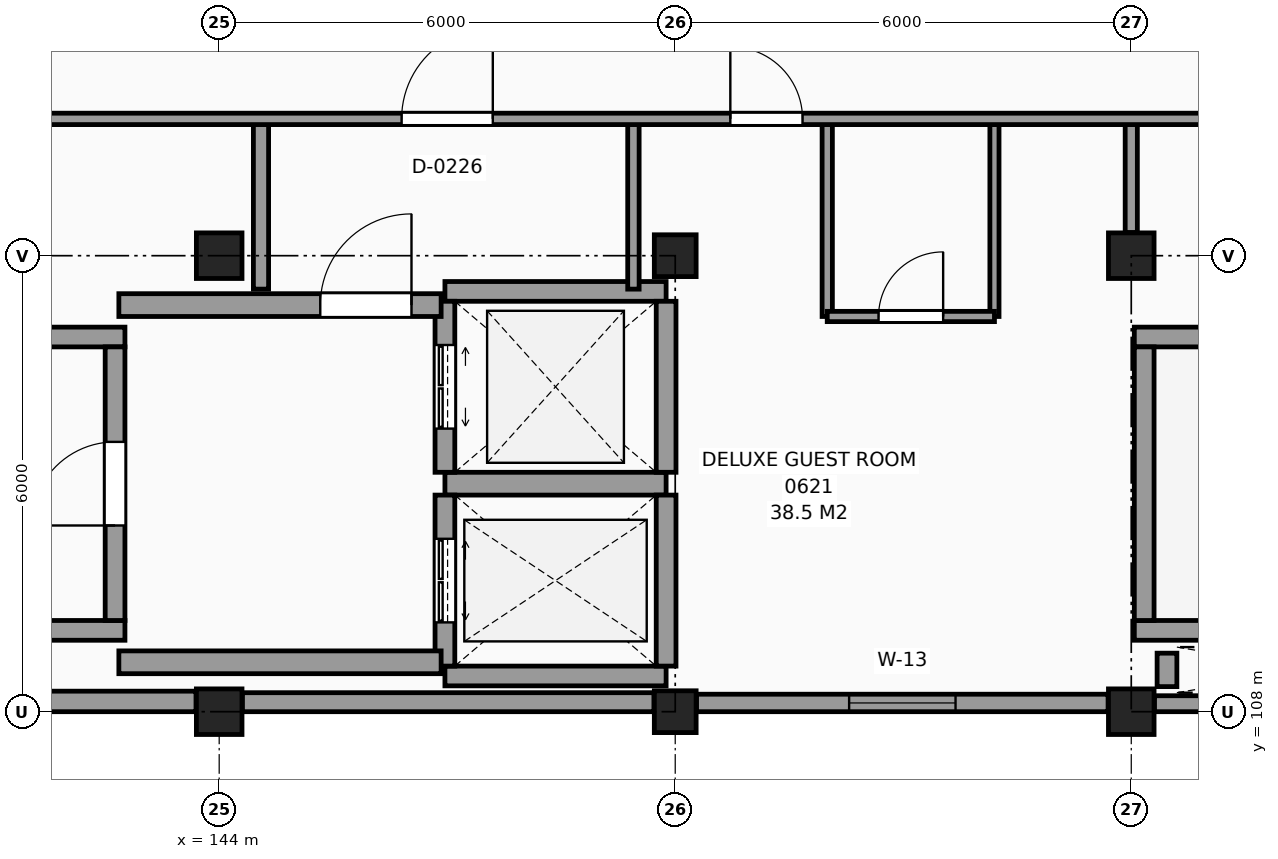
"""IFC4 building model, lengths in metres.
Left out: names, types, materials, properties, quantities, classifications, styles, units other than length and angle.
Written with IfcOpenShell. Run it as: python <this file> out.ifc"""

import sys

from ifc_helpers import new_model, si_unit, direction, frame, frame_2d, origin, origin_2d, place, context, subcontext, project, spatial, rectangle, extrude, element, fill, save


model = new_model("IFC4")
c1 = context("Model", 3, precision=1e-05, world=origin(), true_north=direction((0.0, 1.0)))
c2 = subcontext(c1, "Body", "Model", "MODEL_VIEW")
j1 = project(units=[si_unit("LENGTHUNIT", "METRE"), si_unit("PLANEANGLEUNIT", "RADIAN")], contexts=[c1])
p1 = place(None, origin())
s1 = spatial("IfcSite", under=j1, at=p1, CompositionType="ELEMENT")
p2 = place(p1, origin())
s2 = spatial("IfcBuilding", under=s1, at=p2, CompositionType="ELEMENT")
p3 = place(p2, frame((0.0, 0.0, 28.2)))
s3 = spatial("IfcBuildingStorey", under=s2, at=p3, CompositionType="ELEMENT", Elevation=28.2)
for number, where, z_axis, x_axis in (
    (1, (144.0, 108.0, 0.0), (0.0, 0.0, 1.0), (1.0, 0.0, 0.0)),
    (2, (144.0, 114.0, 0.0), (0.0, 0.0, 1.0), (1.0, 0.0, 0.0)),
):
    element("IfcColumn", number, at=place(p3, frame(where, z_axis=z_axis, x_axis=x_axis)), inside=s3, PredefinedType="COLUMN", context=c2, shape_type="SweptSolid", body=[
        extrude(rectangle(XDim=0.6, YDim=0.6, at=origin_2d()), origin(), (0.0, 0.0, 1.0), 3.3),
    ])
for number, where, z_axis, x_axis in (
    (3, (150.0, 108.0, 0.0), (0.0, 0.0, 1.0), (1.0, 0.0, 0.0)),
    (4, (150.0, 114.0, 0.0), (0.0, 0.0, 1.0), (1.0, 0.0, 0.0)),
):
    element("IfcColumn", number, at=place(p3, frame(where, z_axis=z_axis, x_axis=x_axis)), inside=s3, PredefinedType="COLUMN", context=c2, shape_type="SweptSolid", body=[
        extrude(rectangle(XDim=0.55, YDim=0.55, at=origin_2d()), origin(), (0.0, 0.0, 1.0), 3.3),
    ])
for number, where, z_axis, x_axis in (
    (5, (156.0, 108.0, 0.0), (0.0, 0.0, 1.0), (1.0, 0.0, 0.0)),
    (6, (156.0, 114.0, 0.0), (0.0, 0.0, 1.0), (1.0, 0.0, 0.0)),
):
    element("IfcColumn", number, at=place(p3, frame(where, z_axis=z_axis, x_axis=x_axis)), inside=s3, PredefinedType="COLUMN", context=c2, shape_type="SweptSolid", body=[
        extrude(rectangle(XDim=0.6, YDim=0.6, at=origin_2d()), origin(), (0.0, 0.0, 1.0), 3.3),
    ])
p4 = place(p3, frame((138.28, 108.135, 0.0), z_axis=(0.0, 0.0, 1.0), x_axis=(1.0, 0.0, 0.0)))
e7 = element("IfcWall", 7, at=p4, inside=s3, PredefinedType="SOLIDWALL", context=c2, shape_type="SweptSolid", body=[
    extrude(rectangle(XDim=5.415, YDim=0.27, at=frame_2d((2.708, 0.0))), origin(), (0.0, 0.0, 1.0), 2.43),
])
p5 = place(p3, frame((144.305, 108.125, 0.0), z_axis=(0.0, 0.0, 1.0), x_axis=(1.0, 0.0, 0.0)))
e8 = element("IfcWall", 8, at=p5, inside=s3, PredefinedType="SOLIDWALL", context=c2, shape_type="SweptSolid", body=[
    extrude(rectangle(XDim=5.415, YDim=0.25, at=frame_2d((2.708, 0.0))), origin(), (0.0, 0.0, 1.0), 2.43),
])
p6 = place(p3, frame((150.28, 108.115, 0.0), z_axis=(0.0, 0.0, 1.0), x_axis=(1.0, 0.0, 0.0)))
e9 = element("IfcWall", 9, at=p6, inside=s3, PredefinedType="SOLIDWALL", context=c2, shape_type="SweptSolid", body=[
    extrude(rectangle(XDim=5.415, YDim=0.23, at=frame_2d((2.708, 0.0))), origin(), (0.0, 0.0, 1.0), 2.43),
])
p7 = place(p6, frame((2.008, 0.0, 0.8)))
e10 = element("IfcOpeningElement", 10, at=p7, cuts=e9, PredefinedType="OPENING", context=c2, shape_type="SweptSolid", body=[
    extrude(rectangle(XDim=1.4, YDim=1.4, at=frame_2d((0.7, 0.7))), frame((0.0, 0.125, 0.0), z_axis=(0.0, -1.0, 0.0), x_axis=(1.0, 0.0, 0.0)), (0.0, 0.0, 1.0), 0.25),
])
p8 = place(p3, frame((156.305, 108.105, 0.0), z_axis=(0.0, 0.0, 1.0), x_axis=(1.0, 0.0, 0.0)))
e11 = element("IfcWall", 11, at=p8, inside=s3, PredefinedType="SOLIDWALL", context=c2, shape_type="SweptSolid", body=[
    extrude(rectangle(XDim=5.415, YDim=0.21, at=frame_2d((2.708, 0.0))), origin(), (0.0, 0.0, 1.0), 3.08),
])
for number, where, z_axis, x_axis in (
    (12, (156.04, 109.07, 0.0), (0.0, 0.0, 1.0), (1.0, 0.0, 0.0)),
    (13, (156.04, 112.93, 0.0), (0.0, 0.0, 1.0), (1.0, 0.0, 0.0)),
):
    element("IfcWall", number, at=place(p3, frame(where, z_axis=z_axis, x_axis=x_axis)), inside=s3, PredefinedType="SHEAR", context=c2, shape_type="SweptSolid", body=[
        extrude(rectangle(XDim=10.72, YDim=0.26, at=frame_2d((5.36, 0.0))), origin(), (0.0, 0.0, 1.0), 3.3),
    ])
p9 = place(p3, frame((156.17, 109.2, 0.0), z_axis=(0.0, 0.0, 1.0), x_axis=(0.0, 1.0, 0.0)))
e14 = element("IfcWall", 14, at=p9, inside=s3, PredefinedType="SHEAR", context=c2, shape_type="SweptSolid", body=[
    extrude(rectangle(XDim=3.6, YDim=0.26, at=frame_2d((1.8, 0.0))), origin(), (0.0, 0.0, 1.0), 3.3),
])
p10 = place(p3, frame((156.47, 108.33, 0.0), z_axis=(0.0, 0.0, 1.0), x_axis=(0.0, 1.0, 0.0)))
e15 = element("IfcWall", 15, at=p10, inside=s3, PredefinedType="SHEAR", context=c2, shape_type="SweptSolid", body=[
    extrude(rectangle(XDim=0.44, YDim=0.26, at=frame_2d((0.22, 0.0))), origin(), (0.0, 0.0, 1.0), 3.3),
])
for number, where, z_axis, x_axis in (
    (16, (132.04, 109.07, 0.0), (0.0, 0.0, 1.0), (1.0, 0.0, 0.0)),
    (17, (132.04, 112.93, 0.0), (0.0, 0.0, 1.0), (1.0, 0.0, 0.0)),
):
    element("IfcWall", number, at=place(p3, frame(where, z_axis=z_axis, x_axis=x_axis)), inside=s3, PredefinedType="SHEAR", context=c2, shape_type="SweptSolid", body=[
        extrude(rectangle(XDim=10.72, YDim=0.26, at=frame_2d((5.36, 0.0))), origin(), (0.0, 0.0, 1.0), 3.3),
    ])
p11 = place(p3, frame((142.63, 109.2, 0.0), z_axis=(0.0, 0.0, 1.0), x_axis=(0.0, 1.0, 0.0)))
e18 = element("IfcWall", 18, at=p11, inside=s3, PredefinedType="SHEAR", context=c2, shape_type="SweptSolid", body=[
    extrude(rectangle(XDim=3.6, YDim=0.26, at=frame_2d((1.8, 0.0))), origin(), (0.0, 0.0, 1.0), 3.3),
])
p12 = place(p11, frame((1.25, 0.0, 0.0)))
e19 = element("IfcOpeningElement", 19, at=p12, cuts=e18, PredefinedType="OPENING", context=c2, shape_type="SweptSolid", body=[
    extrude(rectangle(XDim=1.1, YDim=2.15, at=frame_2d((0.55, 1.075))), frame((0.0, 0.14, 0.0), z_axis=(0.0, -1.0, 0.0), x_axis=(1.0, 0.0, 0.0)), (0.0, 0.0, 1.0), 0.28),
])
p13 = place(p3, frame((146.97, 108.47, 0.0), z_axis=(0.0, 0.0, 1.0), x_axis=(1.0, 0.0, 0.0)))
e20 = element("IfcWall", 20, at=p13, inside=s3, PredefinedType="SHEAR", context=c2, shape_type="SweptSolid", body=[
    extrude(rectangle(XDim=2.91, YDim=0.26, at=frame_2d((1.455, 0.0))), origin(), (0.0, 0.0, 1.0), 3.3),
])
p14 = place(p3, frame((146.97, 111.0, 0.0), z_axis=(0.0, 0.0, 1.0), x_axis=(1.0, 0.0, 0.0)))
e21 = element("IfcWall", 21, at=p14, inside=s3, PredefinedType="SHEAR", context=c2, shape_type="SweptSolid", body=[
    extrude(rectangle(XDim=2.91, YDim=0.3, at=frame_2d((1.455, 0.0))), origin(), (0.0, 0.0, 1.0), 3.3),
])
p15 = place(p3, frame((149.88, 108.6, 0.0), z_axis=(0.0, 0.0, 1.0), x_axis=(0.0, 1.0, 0.0)))
e22 = element("IfcWall", 22, at=p15, inside=s3, PredefinedType="SHEAR", context=c2, shape_type="SweptSolid", body=[
    extrude(rectangle(XDim=2.25, YDim=0.26, at=frame_2d((1.125, 0.0))), origin(), (0.0, 0.0, 1.0), 3.3),
])
p16 = place(p3, frame((146.97, 108.6, 0.0), z_axis=(0.0, 0.0, 1.0), x_axis=(0.0, 1.0, 0.0)))
e23 = element("IfcWall", 23, at=p16, inside=s3, PredefinedType="SHEAR", context=c2, shape_type="SweptSolid", body=[
    extrude(rectangle(XDim=2.25, YDim=0.26, at=frame_2d((1.125, 0.0))), origin(), (0.0, 0.0, 1.0), 3.3),
])
p17 = place(p16, frame((0.575, 0.0, 0.0)))
e24 = element("IfcOpeningElement", 24, at=p17, cuts=e23, PredefinedType="OPENING", context=c2, shape_type="SweptSolid", body=[
    extrude(rectangle(XDim=1.1, YDim=2.2, at=frame_2d((0.55, 1.1))), frame((0.0, 0.14, 0.0), z_axis=(0.0, -1.0, 0.0), x_axis=(1.0, 0.0, 0.0)), (0.0, 0.0, 1.0), 0.28),
])
p18 = place(p3, frame((146.97, 113.53, 0.0), z_axis=(0.0, 0.0, 1.0), x_axis=(1.0, 0.0, 0.0)))
e25 = element("IfcWall", 25, at=p18, inside=s3, PredefinedType="SHEAR", context=c2, shape_type="SweptSolid", body=[
    extrude(rectangle(XDim=2.91, YDim=0.26, at=frame_2d((1.455, 0.0))), origin(), (0.0, 0.0, 1.0), 3.3),
])
p19 = place(p3, frame((149.88, 111.15, 0.0), z_axis=(0.0, 0.0, 1.0), x_axis=(0.0, 1.0, 0.0)))
e26 = element("IfcWall", 26, at=p19, inside=s3, PredefinedType="SHEAR", context=c2, shape_type="SweptSolid", body=[
    extrude(rectangle(XDim=2.25, YDim=0.26, at=frame_2d((1.125, 0.0))), origin(), (0.0, 0.0, 1.0), 3.3),
])
p20 = place(p3, frame((146.97, 111.15, 0.0), z_axis=(0.0, 0.0, 1.0), x_axis=(0.0, 1.0, 0.0)))
e27 = element("IfcWall", 27, at=p20, inside=s3, PredefinedType="SHEAR", context=c2, shape_type="SweptSolid", body=[
    extrude(rectangle(XDim=2.25, YDim=0.26, at=frame_2d((1.125, 0.0))), origin(), (0.0, 0.0, 1.0), 3.3),
])
p21 = place(p20, frame((0.575, 0.0, 0.0)))
e28 = element("IfcOpeningElement", 28, at=p21, cuts=e27, PredefinedType="OPENING", context=c2, shape_type="SweptSolid", body=[
    extrude(rectangle(XDim=1.1, YDim=2.2, at=frame_2d((0.55, 1.1))), frame((0.0, 0.14, 0.0), z_axis=(0.0, -1.0, 0.0), x_axis=(1.0, 0.0, 0.0)), (0.0, 0.0, 1.0), 0.28),
])
p22 = place(p3, frame((142.68, 113.35, 0.0), z_axis=(0.0, 0.0, 1.0), x_axis=(1.0, 0.0, 0.0)))
e29 = element("IfcWall", 29, at=p22, inside=s3, PredefinedType="SHEAR", context=c2, shape_type="SweptSolid", body=[
    extrude(rectangle(XDim=4.24, YDim=0.3, at=frame_2d((2.12, 0.0))), origin(), (0.0, 0.0, 1.0), 3.3),
])
p23 = place(p22, frame((2.65, 0.0, 0.0)))
e30 = element("IfcOpeningElement", 30, at=p23, cuts=e29, PredefinedType="OPENING", context=c2, shape_type="SweptSolid", body=[
    extrude(rectangle(XDim=1.2, YDim=2.2, at=frame_2d((0.6, 1.1))), frame((0.0, 0.16, 0.0), z_axis=(0.0, -1.0, 0.0), x_axis=(1.0, 0.0, 0.0)), (0.0, 0.0, 1.0), 0.32),
])
p24 = place(p3, frame((142.68, 108.65, 0.0), z_axis=(0.0, 0.0, 1.0), x_axis=(1.0, 0.0, 0.0)))
e31 = element("IfcWall", 31, at=p24, inside=s3, PredefinedType="SHEAR", context=c2, shape_type="SweptSolid", body=[
    extrude(rectangle(XDim=4.24, YDim=0.3, at=frame_2d((2.12, 0.0))), origin(), (0.0, 0.0, 1.0), 3.3),
])
p25 = place(p3, frame((144.55, 113.56, 0.0), z_axis=(0.0, 0.0, 1.0), x_axis=(0.0, 1.0, 0.0)))
e32 = element("IfcWall", 32, at=p25, inside=s3, PredefinedType="PARTITIONING", context=c2, shape_type="SweptSolid", body=[
    extrude(rectangle(XDim=2.24, YDim=0.2, at=frame_2d((1.12, 0.0))), origin(), (0.0, 0.0, 1.0), 3.08),
])
p26 = place(p3, frame((149.45, 113.56, 0.0), z_axis=(0.0, 0.0, 1.0), x_axis=(0.0, 1.0, 0.0)))
e33 = element("IfcWall", 33, at=p26, inside=s3, PredefinedType="PARTITIONING", context=c2, shape_type="SweptSolid", body=[
    extrude(rectangle(XDim=2.24, YDim=0.15, at=frame_2d((1.12, 0.0))), origin(), (0.0, 0.0, 1.0), 3.08),
])
p27 = place(p3, frame((152.0, 113.2, 0.0), z_axis=(0.0, 0.0, 1.0), x_axis=(0.0, 1.0, 0.0)))
e34 = element("IfcWall", 34, at=p27, inside=s3, PredefinedType="PARTITIONING", context=c2, shape_type="SweptSolid", body=[
    extrude(rectangle(XDim=2.6, YDim=0.135, at=frame_2d((1.3, 0.0))), origin(), (0.0, 0.0, 1.0), 3.08),
])
p28 = place(p3, frame((154.2, 113.2, 0.0), z_axis=(0.0, 0.0, 1.0), x_axis=(0.0, 1.0, 0.0)))
e35 = element("IfcWall", 35, at=p28, inside=s3, PredefinedType="PARTITIONING", context=c2, shape_type="SweptSolid", body=[
    extrude(rectangle(XDim=2.6, YDim=0.12, at=frame_2d((1.3, 0.0))), origin(), (0.0, 0.0, 1.0), 3.08),
])
p29 = place(p3, frame((156.0, 114.305, 0.0), z_axis=(0.0, 0.0, 1.0), x_axis=(0.0, 1.0, 0.0)))
e36 = element("IfcWall", 36, at=p29, inside=s3, PredefinedType="PARTITIONING", context=c2, shape_type="SweptSolid", body=[
    extrude(rectangle(XDim=1.495, YDim=0.16, at=frame_2d((0.748, 0.0))), origin(), (0.0, 0.0, 1.0), 2.38),
])
p30 = place(p3, frame((152.0, 113.2, 0.0), z_axis=(0.0, 0.0, 1.0), x_axis=(1.0, 0.0, 0.0)))
e37 = element("IfcWall", 37, at=p30, inside=s3, PredefinedType="PARTITIONING", context=c2, shape_type="SweptSolid", body=[
    extrude(rectangle(XDim=2.2, YDim=0.135, at=frame_2d((1.1, 0.0))), origin(), (0.0, 0.0, 1.0), 3.08),
])
p31 = place(p30, frame((0.675, 0.0, 0.0)))
e38 = element("IfcOpeningElement", 38, at=p31, cuts=e37, PredefinedType="OPENING", context=c2, shape_type="SweptSolid", body=[
    extrude(rectangle(XDim=0.85, YDim=2.1, at=frame_2d((0.425, 1.05))), frame((0.0, 0.078, 0.0), z_axis=(0.0, -1.0, 0.0), x_axis=(1.0, 0.0, 0.0)), (0.0, 0.0, 1.0), 0.155),
])
p32 = place(p3, frame((66.235, 115.8, 0.0), z_axis=(0.0, 0.0, 1.0), x_axis=(1.0, 0.0, 0.0)))
e39 = element("IfcWall", 39, at=p32, inside=s3, PredefinedType="PARTITIONING", context=c2, shape_type="SweptSolid", body=[
    extrude(rectangle(XDim=103.565, YDim=0.15, at=frame_2d((51.782, 0.0))), origin(), (0.0, 0.0, 1.0), 3.08),
])
p33 = place(p32, frame((80.165, 0.0, 0.0)))
e40 = element("IfcOpeningElement", 40, at=p33, cuts=e39, PredefinedType="OPENING", context=c2, shape_type="SweptSolid", body=[
    extrude(rectangle(XDim=1.2, YDim=2.2, at=frame_2d((0.6, 1.1))), frame((0.0, 0.085, 0.0), z_axis=(0.0, -1.0, 0.0), x_axis=(1.0, 0.0, 0.0)), (0.0, 0.0, 1.0), 0.17),
])
p34 = place(p32, frame((50.165, 0.0, 0.0)))
e41 = element("IfcOpeningElement", 41, at=p34, cuts=e39, PredefinedType="OPENING", context=c2, shape_type="SweptSolid", body=[
    extrude(rectangle(XDim=1.2, YDim=2.2, at=frame_2d((0.6, 1.1))), frame((0.0, 0.085, 0.0), z_axis=(0.0, -1.0, 0.0), x_axis=(1.0, 0.0, 0.0)), (0.0, 0.0, 1.0), 0.17),
])
p35 = place(p32, frame((9.015, 0.0, 0.0)))
e42 = element("IfcOpeningElement", 42, at=p35, cuts=e39, PredefinedType="OPENING", context=c2, shape_type="SweptSolid", body=[
    extrude(rectangle(XDim=1.1, YDim=2.15, at=frame_2d((0.55, 1.075))), frame((0.0, 0.085, 0.0), z_axis=(0.0, -1.0, 0.0), x_axis=(1.0, 0.0, 0.0)), (0.0, 0.0, 1.0), 0.17),
])
p36 = place(p32, frame((55.315, 0.0, 0.0)))
e43 = element("IfcOpeningElement", 43, at=p36, cuts=e39, PredefinedType="OPENING", context=c2, shape_type="SweptSolid", body=[
    extrude(rectangle(XDim=1.0, YDim=2.15, at=frame_2d((0.5, 1.075))), frame((0.0, 0.085, 0.0), z_axis=(0.0, -1.0, 0.0), x_axis=(1.0, 0.0, 0.0)), (0.0, 0.0, 1.0), 0.17),
])
p37 = place(p32, frame((62.285, 0.0, 0.0)))
e44 = element("IfcOpeningElement", 44, at=p37, cuts=e39, PredefinedType="OPENING", context=c2, shape_type="SweptSolid", body=[
    extrude(rectangle(XDim=0.96, YDim=2.15, at=frame_2d((0.48, 1.075))), frame((0.0, 0.085, 0.0), z_axis=(0.0, -1.0, 0.0), x_axis=(1.0, 0.0, 0.0)), (0.0, 0.0, 1.0), 0.17),
])
p38 = place(p32, frame((31.965, 0.0, 0.0)))
e45 = element("IfcOpeningElement", 45, at=p38, cuts=e39, PredefinedType="OPENING", context=c2, shape_type="SweptSolid", body=[
    extrude(rectangle(XDim=1.6, YDim=2.25, at=frame_2d((0.8, 1.125))), frame((0.0, 0.085, 0.0), z_axis=(0.0, -1.0, 0.0), x_axis=(1.0, 0.0, 0.0)), (0.0, 0.0, 1.0), 0.17),
])
p39 = place(p32, frame((18.59, 0.0, 0.0)))
e46 = element("IfcOpeningElement", 46, at=p39, cuts=e39, PredefinedType="OPENING", context=c2, shape_type="SweptSolid", body=[
    extrude(rectangle(XDim=0.95, YDim=2.1, at=frame_2d((0.475, 1.05))), frame((0.0, 0.085, 0.0), z_axis=(0.0, -1.0, 0.0), x_axis=(1.0, 0.0, 0.0)), (0.0, 0.0, 1.0), 0.17),
])
p40 = place(p32, frame((24.59, 0.0, 0.0)))
e47 = element("IfcOpeningElement", 47, at=p40, cuts=e39, PredefinedType="OPENING", context=c2, shape_type="SweptSolid", body=[
    extrude(rectangle(XDim=0.95, YDim=2.1, at=frame_2d((0.475, 1.05))), frame((0.0, 0.085, 0.0), z_axis=(0.0, -1.0, 0.0), x_axis=(1.0, 0.0, 0.0)), (0.0, 0.0, 1.0), 0.17),
])
p41 = place(p32, frame((84.49, 0.0, 0.0)))
e48 = element("IfcOpeningElement", 48, at=p41, cuts=e39, PredefinedType="OPENING", context=c2, shape_type="SweptSolid", body=[
    extrude(rectangle(XDim=0.95, YDim=2.1, at=frame_2d((0.475, 1.05))), frame((0.0, 0.085, 0.0), z_axis=(0.0, -1.0, 0.0), x_axis=(1.0, 0.0, 0.0)), (0.0, 0.0, 1.0), 0.17),
])
p42 = place(p7, origin())
e49 = element("IfcWindow", 49, at=p42, inside=s3, PartitioningType="SINGLE_PANEL", PredefinedType="WINDOW", context=c2, shape_type="SweptSolid", body=[
    extrude(rectangle(XDim=1.4, YDim=1.4, at=frame_2d((0.7, 0.7))), frame((0.0, 0.03, 0.0), z_axis=(0.0, -1.0, 0.0), x_axis=(1.0, 0.0, 0.0)), (0.0, 0.0, 1.0), 0.06),
])
fill(e10, e49)
p43 = place(p12, origin())
e50 = element("IfcDoor", 50, at=p43, inside=s3, OperationType="SINGLE_SWING_LEFT", PredefinedType="DOOR", context=c2, shape_type="SweptSolid", body=[
    extrude(rectangle(XDim=1.1, YDim=2.15, at=frame_2d((0.55, 1.075))), frame((0.0, 0.025, 0.0), z_axis=(0.0, -1.0, 0.0), x_axis=(1.0, 0.0, 0.0)), (0.0, 0.0, 1.0), 0.05),
])
fill(e19, e50)
p44 = place(p17, origin())
e51 = element("IfcDoor", 51, at=p44, inside=s3, OperationType="DOUBLE_DOOR_SLIDING", PredefinedType="DOOR", context=c2, shape_type="SweptSolid", body=[
    extrude(rectangle(XDim=1.1, YDim=2.2, at=frame_2d((0.55, 1.1))), frame((0.0, 0.025, 0.0), z_axis=(0.0, -1.0, 0.0), x_axis=(1.0, 0.0, 0.0)), (0.0, 0.0, 1.0), 0.05),
])
fill(e24, e51)
p45 = place(p21, origin())
e52 = element("IfcDoor", 52, at=p45, inside=s3, OperationType="DOUBLE_DOOR_SLIDING", PredefinedType="DOOR", context=c2, shape_type="SweptSolid", body=[
    extrude(rectangle(XDim=1.1, YDim=2.2, at=frame_2d((0.55, 1.1))), frame((0.0, 0.025, 0.0), z_axis=(0.0, -1.0, 0.0), x_axis=(1.0, 0.0, 0.0)), (0.0, 0.0, 1.0), 0.05),
])
fill(e28, e52)
p46 = place(p23, origin())
e53 = element("IfcDoor", 53, at=p46, inside=s3, OperationType="SINGLE_SWING_RIGHT", PredefinedType="DOOR", context=c2, shape_type="SweptSolid", body=[
    extrude(rectangle(XDim=1.2, YDim=2.2, at=frame_2d((0.6, 1.1))), frame((0.0, 0.025, 0.0), z_axis=(0.0, -1.0, 0.0), x_axis=(1.0, 0.0, 0.0)), (0.0, 0.0, 1.0), 0.05),
])
fill(e30, e53)
p47 = place(p33, origin())
e54 = element("IfcDoor", 54, at=p47, inside=s3, OperationType="SINGLE_SWING_RIGHT", PredefinedType="DOOR", context=c2, shape_type="SweptSolid", body=[
    extrude(rectangle(XDim=1.2, YDim=2.2, at=frame_2d((0.6, 1.1))), frame((0.0, 0.025, 0.0), z_axis=(0.0, -1.0, 0.0), x_axis=(1.0, 0.0, 0.0)), (0.0, 0.0, 1.0), 0.05),
])
fill(e40, e54)
p48 = place(p31, origin())
e55 = element("IfcDoor", 55, at=p48, inside=s3, OperationType="SINGLE_SWING_RIGHT", PredefinedType="DOOR", context=c2, shape_type="SweptSolid", body=[
    extrude(rectangle(XDim=0.85, YDim=2.1, at=frame_2d((0.425, 1.05))), frame((0.0, 0.025, 0.0), z_axis=(0.0, -1.0, 0.0), x_axis=(1.0, 0.0, 0.0)), (0.0, 0.0, 1.0), 0.05),
])
fill(e38, e55)
p49 = place(p41, origin())
e56 = element("IfcDoor", 56, at=p49, inside=s3, OperationType="SINGLE_SWING_LEFT", PredefinedType="DOOR", context=c2, shape_type="SweptSolid", body=[
    extrude(rectangle(XDim=0.95, YDim=2.1, at=frame_2d((0.475, 1.05))), frame((0.0, 0.025, 0.0), z_axis=(0.0, -1.0, 0.0), x_axis=(1.0, 0.0, 0.0)), (0.0, 0.0, 1.0), 0.05),
])
fill(e48, e56)
save(model, sys.argv[1])
